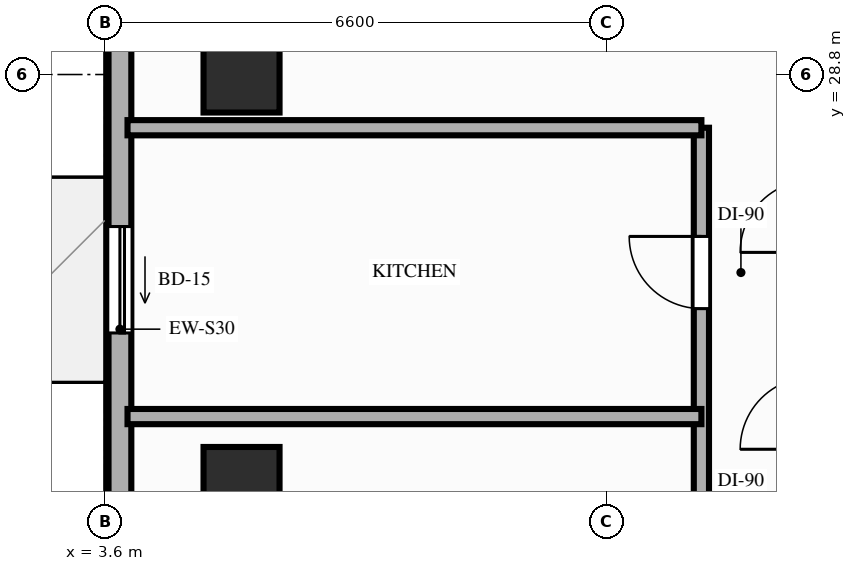
"""IFC4 building model, lengths in metres.
Left out: names, types, materials, properties, quantities, classifications, styles, units other than length and angle.
Written with IfcOpenShell. Run it as: python <this file> out.ifc"""

import sys

from ifc_helpers import new_model, si_unit, direction, frame, frame_2d, origin, origin_2d, place, context, subcontext, project, spatial, rectangle, extrude, element, fill, save


model = new_model("IFC4")
c1 = context("Model", 3, precision=1e-05, world=origin(), true_north=direction((0.0, 1.0)))
c2 = subcontext(c1, "Body", "Model", "MODEL_VIEW")
j1 = project(units=[si_unit("LENGTHUNIT", "METRE"), si_unit("PLANEANGLEUNIT", "RADIAN")], contexts=[c1])
p1 = place(None, origin())
s1 = spatial("IfcSite", under=j1, at=p1, CompositionType="ELEMENT")
p2 = place(p1, origin())
s2 = spatial("IfcBuilding", under=s1, at=p2, CompositionType="ELEMENT")
p3 = place(p2, frame((0.0, 0.0, 120.2)))
s3 = spatial("IfcBuildingStorey", under=s2, at=p3, CompositionType="ELEMENT", Elevation=120.2)
for number, where, z_axis, x_axis in (
    (1, (5.4, 23.4, 0.0), (0.0, 0.0, 1.0), (1.0, 0.0, 0.0)),
    (2, (5.4, 28.8, 0.0), (0.0, 0.0, 1.0), (1.0, 0.0, 0.0)),
):
    element("IfcColumn", number, at=place(p3, frame(where, z_axis=z_axis, x_axis=x_axis)), inside=s3, PredefinedType="COLUMN", context=c2, shape_type="SweptSolid", body=[
        extrude(rectangle(XDim=1.0, YDim=1.0, at=origin_2d()), origin(), (0.0, 0.0, 1.0), 3.2),
    ])
p4 = place(p3, frame((3.8, 42.1, 0.0), z_axis=(0.0, 0.0, 1.0), x_axis=(0.0, -1.0, 0.0)))
e3 = element("IfcWall", 3, at=p4, inside=s3, PredefinedType="STANDARD", context=c2, shape_type="SweptSolid", body=[
    extrude(rectangle(XDim=33.3, YDim=0.3, at=frame_2d((16.65, 0.0))), origin(), (0.0, 0.0, 1.0), 2.71),
])
p5 = place(p4, frame((26.1, 0.0, 0.0)))
e4 = element("IfcOpeningElement", 4, at=p5, cuts=e3, PredefinedType="OPENING", context=c2, shape_type="SweptSolid", body=[
    extrude(rectangle(XDim=1.4, YDim=2.1, at=frame_2d((0.7, 1.05))), frame((0.0, 0.16, 0.0), z_axis=(0.0, -1.0, 0.0), x_axis=(1.0, 0.0, 0.0)), (0.0, 0.0, 1.0), 0.32),
])
p6 = place(p4, frame((15.3, 0.0, 0.0)))
e5 = element("IfcOpeningElement", 5, at=p6, cuts=e3, PredefinedType="OPENING", context=c2, shape_type="SweptSolid", body=[
    extrude(rectangle(XDim=1.4, YDim=2.1, at=frame_2d((0.7, 1.05))), frame((0.0, 0.16, 0.0), z_axis=(0.0, -1.0, 0.0), x_axis=(1.0, 0.0, 0.0)), (0.0, 0.0, 1.0), 0.32),
])
p7 = place(p4, frame((22.36, 0.0, 0.85)))
e6 = element("IfcOpeningElement", 6, at=p7, cuts=e3, PredefinedType="OPENING", context=c2, shape_type="SweptSolid", body=[
    extrude(rectangle(XDim=1.8, YDim=1.61, at=frame_2d((0.9, 0.805))), frame((0.0, 0.16, 0.0), z_axis=(0.0, -1.0, 0.0), x_axis=(1.0, 0.0, 0.0)), (0.0, 0.0, 1.0), 0.32),
])
p8 = place(p4, frame((30.8, 0.0, 0.85)))
e7 = element("IfcOpeningElement", 7, at=p8, cuts=e3, PredefinedType="OPENING", context=c2, shape_type="SweptSolid", body=[
    extrude(rectangle(XDim=1.8, YDim=1.61, at=frame_2d((0.9, 0.805))), frame((0.0, 0.16, 0.0), z_axis=(0.0, -1.0, 0.0), x_axis=(1.0, 0.0, 0.0)), (0.0, 0.0, 1.0), 0.32),
])
p9 = place(p4, frame((9.9, 0.0, 0.85)))
e8 = element("IfcOpeningElement", 8, at=p9, cuts=e3, PredefinedType="OPENING", context=c2, shape_type="SweptSolid", body=[
    extrude(rectangle(XDim=1.8, YDim=1.61, at=frame_2d((0.9, 0.805))), frame((0.0, 0.16, 0.0), z_axis=(0.0, -1.0, 0.0), x_axis=(1.0, 0.0, 0.0)), (0.0, 0.0, 1.0), 0.32),
])
p10 = place(p4, frame((3.8, 0.0, 0.85)))
e9 = element("IfcOpeningElement", 9, at=p10, cuts=e3, PredefinedType="OPENING", context=c2, shape_type="SweptSolid", body=[
    extrude(rectangle(XDim=1.8, YDim=1.61, at=frame_2d((0.9, 0.805))), frame((0.0, 0.16, 0.0), z_axis=(0.0, -1.0, 0.0), x_axis=(1.0, 0.0, 0.0)), (0.0, 0.0, 1.0), 0.32),
])
p11 = place(p3, frame((11.45, 16.6, 0.0), z_axis=(0.0, 0.0, 1.0), x_axis=(0.0, 1.0, 0.0)))
e10 = element("IfcWall", 10, at=p11, inside=s3, PredefinedType="PARTITIONING", context=c2, shape_type="SweptSolid", body=[
    extrude(rectangle(XDim=11.5, YDim=0.2, at=frame_2d((5.75, 0.0))), origin(), (0.0, 0.0, 1.0), 2.41),
])
p12 = place(p11, frame((2.74, 0.0, 0.0)))
e11 = element("IfcOpeningElement", 11, at=p12, cuts=e10, PredefinedType="OPENING", context=c2, shape_type="SweptSolid", body=[
    extrude(rectangle(XDim=0.95, YDim=2.15, at=frame_2d((0.475, 1.075))), frame((0.0, 0.11, 0.0), z_axis=(0.0, -1.0, 0.0), x_axis=(1.0, 0.0, 0.0)), (0.0, 0.0, 1.0), 0.22),
])
p13 = place(p11, frame((5.61, 0.0, 0.0)))
e12 = element("IfcOpeningElement", 12, at=p13, cuts=e10, PredefinedType="OPENING", context=c2, shape_type="SweptSolid", body=[
    extrude(rectangle(XDim=0.95, YDim=2.15, at=frame_2d((0.475, 1.075))), frame((0.0, 0.11, 0.0), z_axis=(0.0, -1.0, 0.0), x_axis=(1.0, 0.0, 0.0)), (0.0, 0.0, 1.0), 0.22),
])
p14 = place(p11, frame((9.12, 0.0, 0.0)))
e13 = element("IfcOpeningElement", 13, at=p14, cuts=e10, PredefinedType="OPENING", context=c2, shape_type="SweptSolid", body=[
    extrude(rectangle(XDim=0.95, YDim=2.15, at=frame_2d((0.475, 1.075))), frame((0.0, 0.11, 0.0), z_axis=(0.0, -1.0, 0.0), x_axis=(1.0, 0.0, 0.0)), (0.0, 0.0, 1.0), 0.22),
])
for number, where, z_axis, x_axis in (
    (14, (3.9, 28.1, 0.0), (0.0, 0.0, 1.0), (1.0, 0.0, 0.0)),
    (15, (3.9, 24.3, 0.0), (0.0, 0.0, 1.0), (1.0, 0.0, 0.0)),
):
    element("IfcWall", number, at=place(p3, frame(where, z_axis=z_axis, x_axis=x_axis)), inside=s3, PredefinedType="PARTITIONING", context=c2, shape_type="SweptSolid", body=[
        extrude(rectangle(XDim=7.55, YDim=0.2, at=frame_2d((3.775, 0.0))), origin(), (0.0, 0.0, 1.0), 2.41),
    ])
p15 = place(p6, origin())
e16 = element("IfcDoor", 16, at=p15, inside=s3, OperationType="SLIDING_TO_RIGHT", PredefinedType="DOOR", context=c2, shape_type="SweptSolid", body=[
    extrude(rectangle(XDim=1.4, YDim=2.1, at=frame_2d((0.7, 1.05))), frame((0.0, 0.025, 0.0), z_axis=(0.0, -1.0, 0.0), x_axis=(1.0, 0.0, 0.0)), (0.0, 0.0, 1.0), 0.05),
])
fill(e5, e16)
p16 = place(p14, origin())
e17 = element("IfcDoor", 17, at=p16, inside=s3, OperationType="SINGLE_SWING_RIGHT", PredefinedType="DOOR", context=c2, shape_type="SweptSolid", body=[
    extrude(rectangle(XDim=0.95, YDim=2.15, at=frame_2d((0.475, 1.075))), frame((0.0, 0.025, 0.0), z_axis=(0.0, -1.0, 0.0), x_axis=(1.0, 0.0, 0.0)), (0.0, 0.0, 1.0), 0.05),
])
fill(e13, e17)
save(model, sys.argv[1])
